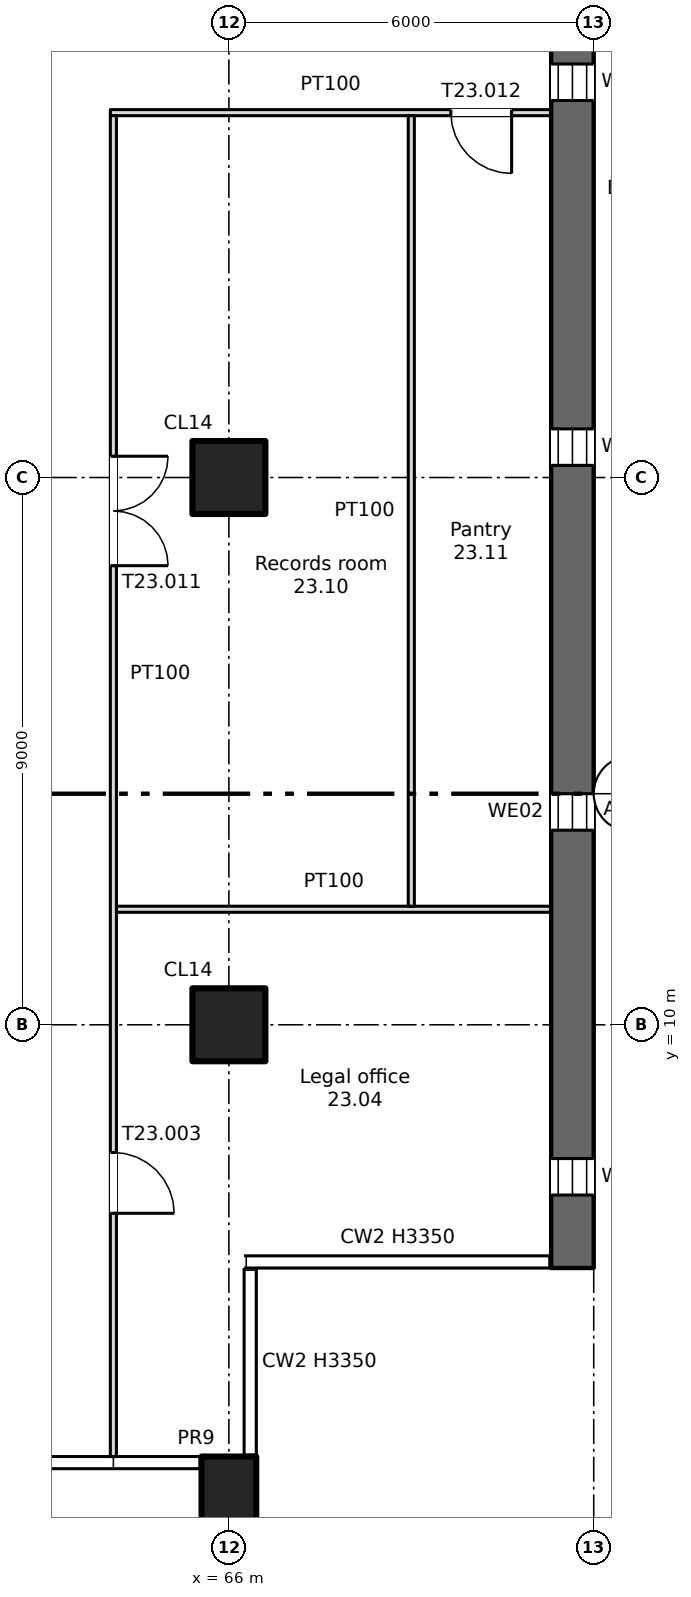
"""IFC4 building model, lengths in metres.
Left out: names, types, materials, properties, quantities, classifications, styles, units other than length and angle.
Written with IfcOpenShell. Run it as: python <this file> out.ifc"""

import sys

from ifc_helpers import new_model, si_unit, direction, frame, frame_2d, origin, origin_2d, place, context, subcontext, project, spatial, rectangle, extrude, element, fill, save


model = new_model("IFC4")
c1 = context("Model", 3, precision=1e-05, world=origin(), true_north=direction((0.0, 1.0)))
c2 = subcontext(c1, "Body", "Model", "MODEL_VIEW")
j1 = project(units=[si_unit("LENGTHUNIT", "METRE"), si_unit("PLANEANGLEUNIT", "RADIAN")], contexts=[c1])
p1 = place(None, origin())
s1 = spatial("IfcSite", under=j1, at=p1, CompositionType="ELEMENT")
p2 = place(p1, origin())
s2 = spatial("IfcBuilding", under=s1, at=p2, CompositionType="ELEMENT")
p3 = place(p2, frame((0.0, 0.0, 151.25)))
s3 = spatial("IfcBuildingStorey", under=s2, at=p3, CompositionType="ELEMENT", Elevation=151.25)
p4 = place(p3, frame((66.0, 2.2, -0.4), z_axis=(0.0, 0.0, 1.0), x_axis=(1.0, 0.0, 0.0)))
e1 = element("IfcColumn", 1, at=p4, inside=s3, PredefinedType="COLUMN", context=c2, shape_type="SweptSolid", body=[
    extrude(rectangle(XDim=0.9, YDim=1.4, at=origin_2d()), origin(), (0.0, 0.0, 1.0), 3.75),
])
for number, where, z_axis, x_axis in (
    (2, (66.0, 10.0, 0.0), (0.0, 0.0, 1.0), (1.0, 0.0, 0.0)),
    (3, (66.0, 19.0, 0.0), (0.0, 0.0, 1.0), (1.0, 0.0, 0.0)),
):
    element("IfcColumn", number, at=place(p3, frame(where, z_axis=z_axis, x_axis=x_axis)), inside=s3, PredefinedType="COLUMN", context=c2, shape_type="SweptSolid", body=[
        extrude(rectangle(XDim=1.2, YDim=1.2, at=origin_2d()), origin(), (0.0, 0.0, 1.0), 3.35),
    ])
p5 = place(p3, frame((71.65, 6.0, 0.0), z_axis=(0.0, 0.0, 1.0), x_axis=(0.0, 1.0, 0.0)))
e4 = element("IfcWall", 4, at=p5, inside=s3, PredefinedType="SHEAR", context=c2, shape_type="SweptSolid", body=[
    extrude(rectangle(XDim=35.5, YDim=0.7, at=frame_2d((17.75, 0.0))), origin(), (0.0, 0.0, 1.0), 3.35),
])
p6 = place(p5, frame((1.2, 0.0, 0.6)))
e5 = element("IfcOpeningElement", 5, at=p6, cuts=e4, PredefinedType="OPENING", context=c2, shape_type="SweptSolid", body=[
    extrude(rectangle(XDim=0.6, YDim=2.4, at=frame_2d((0.3, 1.2))), frame((0.0, 0.36, 0.0), z_axis=(0.0, -1.0, 0.0), x_axis=(1.0, 0.0, 0.0)), (0.0, 0.0, 1.0), 0.72),
])
p7 = place(p5, frame((7.2, 0.0, 0.6)))
e6 = element("IfcOpeningElement", 6, at=p7, cuts=e4, PredefinedType="OPENING", context=c2, shape_type="SweptSolid", body=[
    extrude(rectangle(XDim=0.6, YDim=2.4, at=frame_2d((0.3, 1.2))), frame((0.0, 0.36, 0.0), z_axis=(0.0, -1.0, 0.0), x_axis=(1.0, 0.0, 0.0)), (0.0, 0.0, 1.0), 0.72),
])
p8 = place(p5, frame((13.2, 0.0, 0.6)))
e7 = element("IfcOpeningElement", 7, at=p8, cuts=e4, PredefinedType="OPENING", context=c2, shape_type="SweptSolid", body=[
    extrude(rectangle(XDim=0.6, YDim=2.4, at=frame_2d((0.3, 1.2))), frame((0.0, 0.36, 0.0), z_axis=(0.0, -1.0, 0.0), x_axis=(1.0, 0.0, 0.0)), (0.0, 0.0, 1.0), 0.72),
])
p9 = place(p5, frame((19.2, 0.0, 0.6)))
e8 = element("IfcOpeningElement", 8, at=p9, cuts=e4, PredefinedType="OPENING", context=c2, shape_type="SweptSolid", body=[
    extrude(rectangle(XDim=0.6, YDim=2.4, at=frame_2d((0.3, 1.2))), frame((0.0, 0.36, 0.0), z_axis=(0.0, -1.0, 0.0), x_axis=(1.0, 0.0, 0.0)), (0.0, 0.0, 1.0), 0.72),
])
p10 = place(p5, frame((25.2, 0.0, 0.6)))
e9 = element("IfcOpeningElement", 9, at=p10, cuts=e4, PredefinedType="OPENING", context=c2, shape_type="SweptSolid", body=[
    extrude(rectangle(XDim=0.6, YDim=2.4, at=frame_2d((0.3, 1.2))), frame((0.0, 0.36, 0.0), z_axis=(0.0, -1.0, 0.0), x_axis=(1.0, 0.0, 0.0)), (0.0, 0.0, 1.0), 0.72),
])
p11 = place(p5, frame((31.2, 0.0, 0.6)))
e10 = element("IfcOpeningElement", 10, at=p11, cuts=e4, PredefinedType="OPENING", context=c2, shape_type="SweptSolid", body=[
    extrude(rectangle(XDim=0.6, YDim=2.4, at=frame_2d((0.3, 1.2))), frame((0.0, 0.36, 0.0), z_axis=(0.0, -1.0, 0.0), x_axis=(1.0, 0.0, 0.0)), (0.0, 0.0, 1.0), 0.72),
])
p12 = place(p3, frame((64.15, 11.9, 0.0), z_axis=(0.0, 0.0, 1.0), x_axis=(1.0, 0.0, 0.0)))
e11 = element("IfcWall", 11, at=p12, inside=s3, PredefinedType="PARTITIONING", context=c2, shape_type="SweptSolid", body=[
    extrude(rectangle(XDim=7.15, YDim=0.1, at=frame_2d((3.575, 0.0))), origin(), (0.0, 0.0, 1.0), 3.35),
])
p13 = place(p3, frame((64.05, 25.0, 0.0), z_axis=(0.0, 0.0, 1.0), x_axis=(1.0, 0.0, 0.0)))
e12 = element("IfcWall", 12, at=p13, inside=s3, PredefinedType="PARTITIONING", context=c2, shape_type="SweptSolid", body=[
    extrude(rectangle(XDim=7.25, YDim=0.1, at=frame_2d((3.625, 0.0))), origin(), (0.0, 0.0, 1.0), 3.35),
])
p14 = place(p13, frame((5.6, 0.0, 0.0)))
e13 = element("IfcOpeningElement", 13, at=p14, cuts=e12, PredefinedType="OPENING", context=c2, shape_type="SweptSolid", body=[
    extrude(rectangle(XDim=1.0, YDim=2.1, at=frame_2d((0.5, 1.05))), frame((0.0, 0.06, 0.0), z_axis=(0.0, -1.0, 0.0), x_axis=(1.0, 0.0, 0.0)), (0.0, 0.0, 1.0), 0.12),
])
p15 = place(p3, frame((64.1, 2.9, 0.0), z_axis=(0.0, 0.0, 1.0), x_axis=(0.0, 1.0, 0.0)))
e14 = element("IfcWall", 14, at=p15, inside=s3, PredefinedType="PARTITIONING", context=c2, shape_type="SweptSolid", body=[
    extrude(rectangle(XDim=22.05, YDim=0.1, at=frame_2d((11.025, 0.0))), origin(), (0.0, 0.0, 1.0), 3.35),
])
p16 = place(p15, frame((4.0, 0.0, 0.0)))
e15 = element("IfcOpeningElement", 15, at=p16, cuts=e14, PredefinedType="OPENING", context=c2, shape_type="SweptSolid", body=[
    extrude(rectangle(XDim=1.0, YDim=2.1, at=frame_2d((0.5, 1.05))), frame((0.0, 0.06, 0.0), z_axis=(0.0, -1.0, 0.0), x_axis=(1.0, 0.0, 0.0)), (0.0, 0.0, 1.0), 0.12),
])
p17 = place(p15, frame((14.65, 0.0, 0.0)))
e16 = element("IfcOpeningElement", 16, at=p17, cuts=e14, PredefinedType="OPENING", context=c2, shape_type="SweptSolid", body=[
    extrude(rectangle(XDim=1.8, YDim=2.1, at=frame_2d((0.9, 1.05))), frame((0.0, 0.06, 0.0), z_axis=(0.0, -1.0, 0.0), x_axis=(1.0, 0.0, 0.0)), (0.0, 0.0, 1.0), 0.12),
])
p18 = place(p3, frame((69.0, 11.95, 0.0), z_axis=(0.0, 0.0, 1.0), x_axis=(0.0, 1.0, 0.0)))
e17 = element("IfcWall", 17, at=p18, inside=s3, PredefinedType="PARTITIONING", context=c2, shape_type="SweptSolid", body=[
    extrude(rectangle(XDim=13.0, YDim=0.1, at=frame_2d((6.5, 0.0))), origin(), (0.0, 0.0, 1.0), 3.35),
])
p19 = place(p6, origin())
e18 = element("IfcWindow", 18, at=p19, inside=s3, PartitioningType="SINGLE_PANEL", PredefinedType="WINDOW", context=c2, shape_type="SweptSolid", body=[
    extrude(rectangle(XDim=0.6, YDim=2.4, at=frame_2d((0.3, 1.2))), frame((0.0, 0.03, 0.0), z_axis=(0.0, -1.0, 0.0), x_axis=(1.0, 0.0, 0.0)), (0.0, 0.0, 1.0), 0.06),
])
fill(e5, e18)
p20 = place(p7, origin())
e19 = element("IfcWindow", 19, at=p20, inside=s3, PartitioningType="SINGLE_PANEL", PredefinedType="WINDOW", context=c2, shape_type="SweptSolid", body=[
    extrude(rectangle(XDim=0.6, YDim=2.4, at=frame_2d((0.3, 1.2))), frame((0.0, 0.03, 0.0), z_axis=(0.0, -1.0, 0.0), x_axis=(1.0, 0.0, 0.0)), (0.0, 0.0, 1.0), 0.06),
])
fill(e6, e19)
p21 = place(p8, origin())
e20 = element("IfcWindow", 20, at=p21, inside=s3, PartitioningType="SINGLE_PANEL", PredefinedType="WINDOW", context=c2, shape_type="SweptSolid", body=[
    extrude(rectangle(XDim=0.6, YDim=2.4, at=frame_2d((0.3, 1.2))), frame((0.0, 0.03, 0.0), z_axis=(0.0, -1.0, 0.0), x_axis=(1.0, 0.0, 0.0)), (0.0, 0.0, 1.0), 0.06),
])
fill(e7, e20)
p22 = place(p9, origin())
e21 = element("IfcWindow", 21, at=p22, inside=s3, PartitioningType="SINGLE_PANEL", PredefinedType="WINDOW", context=c2, shape_type="SweptSolid", body=[
    extrude(rectangle(XDim=0.6, YDim=2.4, at=frame_2d((0.3, 1.2))), frame((0.0, 0.03, 0.0), z_axis=(0.0, -1.0, 0.0), x_axis=(1.0, 0.0, 0.0)), (0.0, 0.0, 1.0), 0.06),
])
fill(e8, e21)
p23 = place(p16, origin())
e22 = element("IfcDoor", 22, at=p23, inside=s3, OperationType="SINGLE_SWING_LEFT", PredefinedType="DOOR", context=c2, shape_type="SweptSolid", body=[
    extrude(rectangle(XDim=1.0, YDim=2.1, at=frame_2d((0.5, 1.05))), frame((0.0, 0.025, 0.0), z_axis=(0.0, -1.0, 0.0), x_axis=(1.0, 0.0, 0.0)), (0.0, 0.0, 1.0), 0.05),
])
fill(e15, e22)
p24 = place(p17, origin())
e23 = element("IfcDoor", 23, at=p24, inside=s3, OperationType="DOUBLE_DOOR_SINGLE_SWING", PredefinedType="DOOR", context=c2, shape_type="SweptSolid", body=[
    extrude(rectangle(XDim=1.8, YDim=2.1, at=frame_2d((0.9, 1.05))), frame((0.0, 0.025, 0.0), z_axis=(0.0, -1.0, 0.0), x_axis=(1.0, 0.0, 0.0)), (0.0, 0.0, 1.0), 0.05),
])
fill(e16, e23)
p25 = place(p14, origin())
e24 = element("IfcDoor", 24, at=p25, inside=s3, OperationType="SINGLE_SWING_RIGHT", PredefinedType="DOOR", context=c2, shape_type="SweptSolid", body=[
    extrude(rectangle(XDim=1.0, YDim=2.1, at=frame_2d((0.5, 1.05))), frame((0.0, 0.025, 0.0), z_axis=(0.0, -1.0, 0.0), x_axis=(1.0, 0.0, 0.0)), (0.0, 0.0, 1.0), 0.05),
])
fill(e13, e24)
save(model, sys.argv[1])
